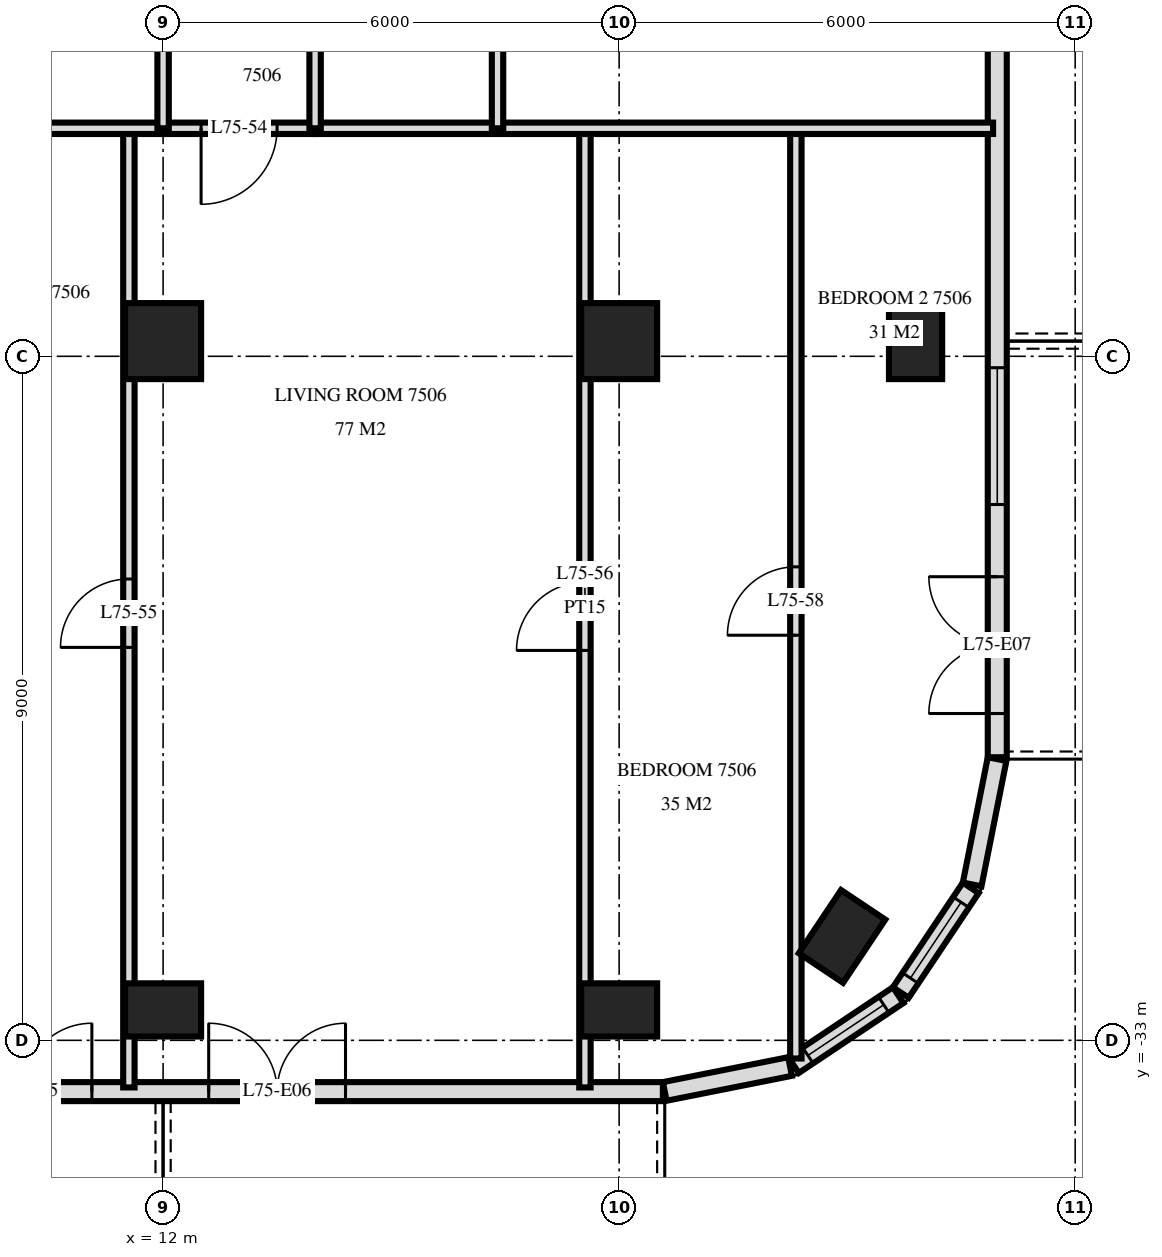
"""IFC4 building model, lengths in metres.
Left out: names, types, materials, properties, quantities, classifications, styles, units other than length and angle.
Written with IfcOpenShell. Run it as: python <this file> out.ifc"""

import sys

from ifc_helpers import new_model, si_unit, direction, frame, frame_2d, origin, origin_2d, place, context, subcontext, project, spatial, rectangle, extrude, element, fill, save


model = new_model("IFC4")
c1 = context("Model", 3, precision=1e-05, world=origin(), true_north=direction((0.0, 1.0)))
c2 = subcontext(c1, "Body", "Model", "MODEL_VIEW")
j1 = project(units=[si_unit("LENGTHUNIT", "METRE"), si_unit("PLANEANGLEUNIT", "RADIAN")], contexts=[c1])
p1 = place(None, origin())
s1 = spatial("IfcSite", under=j1, at=p1, CompositionType="ELEMENT")
p2 = place(p1, origin())
s2 = spatial("IfcBuilding", under=s1, at=p2, CompositionType="ELEMENT")
p3 = place(p2, frame((0.0, 0.0, 284.1)))
s3 = spatial("IfcBuildingStorey", under=s2, at=p3, CompositionType="ELEMENT", Elevation=284.1)
p4 = place(p3, frame((12.0, -32.6, 0.0), z_axis=(0.0, 0.0, 1.0), x_axis=(1.0, 0.0, 0.0)))
e1 = element("IfcColumn", 1, at=p4, inside=s3, PredefinedType="COLUMN", context=c2, shape_type="SweptSolid", body=[
    extrude(rectangle(XDim=1.0, YDim=0.7, at=origin_2d()), origin(), (0.0, 0.0, 1.0), 3.5),
])
p5 = place(p3, frame((12.0, -23.8, 0.0), z_axis=(0.0, 0.0, 1.0), x_axis=(1.0, 0.0, 0.0)))
e2 = element("IfcColumn", 2, at=p5, inside=s3, PredefinedType="COLUMN", context=c2, shape_type="SweptSolid", body=[
    extrude(rectangle(XDim=1.0, YDim=1.0, at=origin_2d()), origin(), (0.0, 0.0, 1.0), 3.5),
])
p6 = place(p3, frame((18.0, -32.6, 0.0), z_axis=(0.0, 0.0, 1.0), x_axis=(1.0, 0.0, 0.0)))
e3 = element("IfcColumn", 3, at=p6, inside=s3, PredefinedType="COLUMN", context=c2, shape_type="SweptSolid", body=[
    extrude(rectangle(XDim=1.0, YDim=0.7, at=origin_2d()), origin(), (0.0, 0.0, 1.0), 3.5),
])
p7 = place(p3, frame((18.0, -23.8, 0.0), z_axis=(0.0, 0.0, 1.0), x_axis=(1.0, 0.0, 0.0)))
e4 = element("IfcColumn", 4, at=p7, inside=s3, PredefinedType="COLUMN", context=c2, shape_type="SweptSolid", body=[
    extrude(rectangle(XDim=1.0, YDim=1.0, at=origin_2d()), origin(), (0.0, 0.0, 1.0), 3.5),
])
for number, where, z_axis, x_axis in (
    (5, (20.933, -31.633, 0.0), (0.0, 0.0, 1.0), (0.556, 0.831, 0.0)),
    (6, (21.9, -23.8, 0.0), (0.0, 0.0, 1.0), (0.0, 1.0, 0.0)),
):
    element("IfcColumn", number, at=place(p3, frame(where, z_axis=z_axis, x_axis=x_axis)), inside=s3, PredefinedType="COLUMN", context=c2, shape_type="SweptSolid", body=[
        extrude(rectangle(XDim=1.0, YDim=0.7, at=origin_2d()), origin(), (0.0, 0.0, 1.0), 3.5),
    ])
p8 = place(p3, frame((-18.575, -33.675, 0.0), z_axis=(0.0, 0.0, 1.0), x_axis=(1.0, 0.0, 0.0)))
e7 = element("IfcWall", 7, at=p8, inside=s3, PredefinedType="SOLIDWALL", context=c2, shape_type="SweptSolid", body=[
    extrude(rectangle(XDim=37.151, YDim=0.25, at=frame_2d((18.575, 0.0))), origin(), (0.0, 0.0, 1.0), 3.22),
])
p9 = place(p8, frame((1.175, 0.0, 0.0)))
e8 = element("IfcOpeningElement", 8, at=p9, cuts=e7, PredefinedType="OPENING", context=c2, shape_type="SweptSolid", body=[
    extrude(rectangle(XDim=1.8, YDim=2.4, at=frame_2d((0.9, 1.2))), frame((0.0, 0.135, 0.0), z_axis=(0.0, -1.0, 0.0), x_axis=(1.0, 0.0, 0.0)), (0.0, 0.0, 1.0), 0.27),
])
p10 = place(p8, frame((4.4, 0.0, 0.9)))
e9 = element("IfcOpeningElement", 9, at=p10, cuts=e7, PredefinedType="OPENING", context=c2, shape_type="SweptSolid", body=[
    extrude(rectangle(XDim=1.8, YDim=1.5, at=frame_2d((0.9, 0.75))), frame((0.0, 0.135, 0.0), z_axis=(0.0, -1.0, 0.0), x_axis=(1.0, 0.0, 0.0)), (0.0, 0.0, 1.0), 0.27),
])
p11 = place(p8, frame((6.875, 0.0, 0.9)))
e10 = element("IfcOpeningElement", 10, at=p11, cuts=e7, PredefinedType="OPENING", context=c2, shape_type="SweptSolid", body=[
    extrude(rectangle(XDim=2.4, YDim=1.5, at=frame_2d((1.2, 0.75))), frame((0.0, 0.135, 0.0), z_axis=(0.0, -1.0, 0.0), x_axis=(1.0, 0.0, 0.0)), (0.0, 0.0, 1.0), 0.27),
])
p12 = place(p8, frame((10.175, 0.0, 0.0)))
e11 = element("IfcOpeningElement", 11, at=p12, cuts=e7, PredefinedType="OPENING", context=c2, shape_type="SweptSolid", body=[
    extrude(rectangle(XDim=1.8, YDim=2.4, at=frame_2d((0.9, 1.2))), frame((0.0, 0.135, 0.0), z_axis=(0.0, -1.0, 0.0), x_axis=(1.0, 0.0, 0.0)), (0.0, 0.0, 1.0), 0.27),
])
p13 = place(p8, frame((13.175, 0.0, 0.0)))
e12 = element("IfcOpeningElement", 12, at=p13, cuts=e7, PredefinedType="OPENING", context=c2, shape_type="SweptSolid", body=[
    extrude(rectangle(XDim=1.8, YDim=2.4, at=frame_2d((0.9, 1.2))), frame((0.0, 0.135, 0.0), z_axis=(0.0, -1.0, 0.0), x_axis=(1.0, 0.0, 0.0)), (0.0, 0.0, 1.0), 0.27),
])
p14 = place(p8, frame((15.875, 0.0, 0.9)))
e13 = element("IfcOpeningElement", 13, at=p14, cuts=e7, PredefinedType="OPENING", context=c2, shape_type="SweptSolid", body=[
    extrude(rectangle(XDim=2.4, YDim=1.5, at=frame_2d((1.2, 0.75))), frame((0.0, 0.135, 0.0), z_axis=(0.0, -1.0, 0.0), x_axis=(1.0, 0.0, 0.0)), (0.0, 0.0, 1.0), 0.27),
])
p15 = place(p8, frame((19.175, 0.0, 0.0)))
e14 = element("IfcOpeningElement", 14, at=p15, cuts=e7, PredefinedType="OPENING", context=c2, shape_type="SweptSolid", body=[
    extrude(rectangle(XDim=1.8, YDim=2.4, at=frame_2d((0.9, 1.2))), frame((0.0, 0.135, 0.0), z_axis=(0.0, -1.0, 0.0), x_axis=(1.0, 0.0, 0.0)), (0.0, 0.0, 1.0), 0.27),
])
p16 = place(p8, frame((21.875, 0.0, 0.9)))
e15 = element("IfcOpeningElement", 15, at=p16, cuts=e7, PredefinedType="OPENING", context=c2, shape_type="SweptSolid", body=[
    extrude(rectangle(XDim=2.4, YDim=1.5, at=frame_2d((1.2, 0.75))), frame((0.0, 0.135, 0.0), z_axis=(0.0, -1.0, 0.0), x_axis=(1.0, 0.0, 0.0)), (0.0, 0.0, 1.0), 0.27),
])
p17 = place(p8, frame((25.063, 0.0, 0.9)))
e16 = element("IfcOpeningElement", 16, at=p17, cuts=e7, PredefinedType="OPENING", context=c2, shape_type="SweptSolid", body=[
    extrude(rectangle(XDim=1.8, YDim=1.5, at=frame_2d((0.9, 0.75))), frame((0.0, 0.135, 0.0), z_axis=(0.0, -1.0, 0.0), x_axis=(1.0, 0.0, 0.0)), (0.0, 0.0, 1.0), 0.27),
])
p18 = place(p8, frame((27.838, 0.0, 0.0)))
e17 = element("IfcOpeningElement", 17, at=p18, cuts=e7, PredefinedType="OPENING", context=c2, shape_type="SweptSolid", body=[
    extrude(rectangle(XDim=1.8, YDim=2.4, at=frame_2d((0.9, 1.2))), frame((0.0, 0.135, 0.0), z_axis=(0.0, -1.0, 0.0), x_axis=(1.0, 0.0, 0.0)), (0.0, 0.0, 1.0), 0.27),
])
p19 = place(p8, frame((31.175, 0.0, 0.0)))
e18 = element("IfcOpeningElement", 18, at=p19, cuts=e7, PredefinedType="OPENING", context=c2, shape_type="SweptSolid", body=[
    extrude(rectangle(XDim=1.8, YDim=2.4, at=frame_2d((0.9, 1.2))), frame((0.0, 0.135, 0.0), z_axis=(0.0, -1.0, 0.0), x_axis=(1.0, 0.0, 0.0)), (0.0, 0.0, 1.0), 0.27),
])
p20 = place(p3, frame((18.6, -33.673, 0.0), z_axis=(0.0, 0.0, 1.0), x_axis=(0.980770110232, 0.195166572128, 0.0)))
e19 = element("IfcWall", 19, at=p20, inside=s3, PredefinedType="SOLIDWALL", context=c2, shape_type="SweptSolid", body=[
    extrude(rectangle(XDim=1.681, YDim=0.25, at=frame_2d((0.841, 0.0))), origin(), (0.0, 0.0, 1.0), 3.22),
])
p21 = place(p3, frame((20.294, -33.326, 0.0), z_axis=(0.0, 0.0, 1.0), x_axis=(0.831482937015, 0.55555029066, 0.0)))
e20 = element("IfcWall", 20, at=p21, inside=s3, PredefinedType="SOLIDWALL", context=c2, shape_type="SweptSolid", body=[
    extrude(rectangle(XDim=1.656, YDim=0.25, at=frame_2d((0.828, 0.0))), origin(), (0.0, 0.0, 1.0), 3.22),
])
p22 = place(p21, frame((0.228, 0.0, 0.9)))
e21 = element("IfcOpeningElement", 21, at=p22, cuts=e20, PredefinedType="OPENING", context=c2, shape_type="SweptSolid", body=[
    extrude(rectangle(XDim=1.2, YDim=1.5, at=frame_2d((0.6, 0.75))), frame((0.0, 0.135, 0.0), z_axis=(0.0, -1.0, 0.0), x_axis=(1.0, 0.0, 0.0)), (0.0, 0.0, 1.0), 0.27),
])
p23 = place(p3, frame((21.706, -32.371, 0.0), z_axis=(0.0, 0.0, 1.0), x_axis=(0.55555029066, 0.831482937015, 0.0)))
e22 = element("IfcWall", 22, at=p23, inside=s3, PredefinedType="SOLIDWALL", context=c2, shape_type="SweptSolid", body=[
    extrude(rectangle(XDim=1.656, YDim=0.25, at=frame_2d((0.828, 0.0))), origin(), (0.0, 0.0, 1.0), 3.22),
])
p24 = place(p23, frame((0.228, 0.0, 0.9)))
e23 = element("IfcOpeningElement", 23, at=p24, cuts=e22, PredefinedType="OPENING", context=c2, shape_type="SweptSolid", body=[
    extrude(rectangle(XDim=1.2, YDim=1.5, at=frame_2d((0.6, 0.75))), frame((0.0, 0.135, 0.0), z_axis=(0.0, -1.0, 0.0), x_axis=(1.0, 0.0, 0.0)), (0.0, 0.0, 1.0), 0.27),
])
p25 = place(p3, frame((22.645, -30.949, 0.0), z_axis=(0.0, 0.0, 1.0), x_axis=(0.19513878023, 0.980775640221, 0.0)))
e24 = element("IfcWall", 24, at=p25, inside=s3, PredefinedType="SOLIDWALL", context=c2, shape_type="SweptSolid", body=[
    extrude(rectangle(XDim=1.681, YDim=0.25, at=frame_2d((0.841, 0.0))), origin(), (0.0, 0.0, 1.0), 3.22),
])
p26 = place(p3, frame((22.975, -29.275, 0.0), z_axis=(0.0, 0.0, 1.0), x_axis=(0.0, 1.0, 0.0)))
e25 = element("IfcWall", 25, at=p26, inside=s3, PredefinedType="SOLIDWALL", context=c2, shape_type="SweptSolid", body=[
    extrude(rectangle(XDim=25.951, YDim=0.25, at=frame_2d((12.975, 0.0))), origin(), (0.0, 0.0, 1.0), 3.22),
])
p27 = place(p26, frame((0.575, 0.0, 0.0)))
e26 = element("IfcOpeningElement", 26, at=p27, cuts=e25, PredefinedType="OPENING", context=c2, shape_type="SweptSolid", body=[
    extrude(rectangle(XDim=1.8, YDim=2.4, at=frame_2d((0.9, 1.2))), frame((0.0, 0.135, 0.0), z_axis=(0.0, -1.0, 0.0), x_axis=(1.0, 0.0, 0.0)), (0.0, 0.0, 1.0), 0.27),
])
p28 = place(p26, frame((3.325, 0.0, 0.9)))
e27 = element("IfcOpeningElement", 27, at=p28, cuts=e25, PredefinedType="OPENING", context=c2, shape_type="SweptSolid", body=[
    extrude(rectangle(XDim=1.8, YDim=1.5, at=frame_2d((0.9, 0.75))), frame((0.0, 0.135, 0.0), z_axis=(0.0, -1.0, 0.0), x_axis=(1.0, 0.0, 0.0)), (0.0, 0.0, 1.0), 0.27),
])
p29 = place(p26, frame((9.475, 0.0, 0.0)))
e28 = element("IfcOpeningElement", 28, at=p29, cuts=e25, PredefinedType="OPENING", context=c2, shape_type="SweptSolid", body=[
    extrude(rectangle(XDim=1.8, YDim=2.4, at=frame_2d((0.9, 1.2))), frame((0.0, 0.135, 0.0), z_axis=(0.0, -1.0, 0.0), x_axis=(1.0, 0.0, 0.0)), (0.0, 0.0, 1.0), 0.27),
])
p30 = place(p26, frame((16.175, 0.0, 0.0)))
e29 = element("IfcOpeningElement", 29, at=p30, cuts=e25, PredefinedType="OPENING", context=c2, shape_type="SweptSolid", body=[
    extrude(rectangle(XDim=1.8, YDim=2.4, at=frame_2d((0.9, 1.2))), frame((0.0, 0.135, 0.0), z_axis=(0.0, -1.0, 0.0), x_axis=(1.0, 0.0, 0.0)), (0.0, 0.0, 1.0), 0.27),
])
p31 = place(p26, frame((22.675, 0.0, 0.0)))
e30 = element("IfcOpeningElement", 30, at=p31, cuts=e25, PredefinedType="OPENING", context=c2, shape_type="SweptSolid", body=[
    extrude(rectangle(XDim=1.8, YDim=2.4, at=frame_2d((0.9, 1.2))), frame((0.0, 0.135, 0.0), z_axis=(0.0, -1.0, 0.0), x_axis=(1.0, 0.0, 0.0)), (0.0, 0.0, 1.0), 0.27),
])
p32 = place(p3, frame((20.325, -33.239, 0.0), z_axis=(0.0, 0.0, 1.0), x_axis=(0.0, 1.0, 0.0)))
e31 = element("IfcWall", 31, at=p32, inside=s3, PredefinedType="PARTITIONING", context=c2, shape_type="SweptSolid", body=[
    extrude(rectangle(XDim=12.239, YDim=0.15, at=frame_2d((6.12, 0.0))), origin(), (0.0, 0.0, 1.0), 3.22),
])
p33 = place(p32, frame((5.569, 0.0, 0.0)))
e32 = element("IfcOpeningElement", 32, at=p33, cuts=e31, PredefinedType="OPENING", context=c2, shape_type="SweptSolid", body=[
    extrude(rectangle(XDim=0.9, YDim=2.1, at=frame_2d((0.45, 1.05))), frame((0.0, 0.085, 0.0), z_axis=(0.0, -1.0, 0.0), x_axis=(1.0, 0.0, 0.0)), (0.0, 0.0, 1.0), 0.17),
])
p34 = place(p3, frame((17.55, -33.62, 0.0), z_axis=(0.0, 0.0, 1.0), x_axis=(0.0, 1.0, 0.0)))
e33 = element("IfcWall", 33, at=p34, inside=s3, PredefinedType="PARTITIONING", context=c2, shape_type="SweptSolid", body=[
    extrude(rectangle(XDim=12.62, YDim=0.15, at=frame_2d((6.31, 0.0))), origin(), (0.0, 0.0, 1.0), 3.22),
])
p35 = place(p34, frame((5.75, 0.0, 0.0)))
e34 = element("IfcOpeningElement", 34, at=p35, cuts=e33, PredefinedType="OPENING", context=c2, shape_type="SweptSolid", body=[
    extrude(rectangle(XDim=0.9, YDim=2.1, at=frame_2d((0.45, 1.05))), frame((0.0, 0.085, 0.0), z_axis=(0.0, -1.0, 0.0), x_axis=(1.0, 0.0, 0.0)), (0.0, 0.0, 1.0), 0.17),
])
p36 = place(p3, frame((16.4, -21.0, 0.0), z_axis=(0.0, 0.0, 1.0), x_axis=(0.0, 1.0, 0.0)))
e35 = element("IfcWall", 35, at=p36, inside=s3, PredefinedType="PARTITIONING", context=c2, shape_type="SweptSolid", body=[
    extrude(rectangle(XDim=4.2, YDim=0.15, at=frame_2d((2.1, 0.0))), origin(), (0.0, 0.0, 1.0), 3.22),
])
p37 = place(p3, frame((14.0, -21.0, 0.0), z_axis=(0.0, 0.0, 1.0), x_axis=(0.0, 1.0, 0.0)))
e36 = element("IfcWall", 36, at=p37, inside=s3, PredefinedType="PARTITIONING", context=c2, shape_type="SweptSolid", body=[
    extrude(rectangle(XDim=4.2, YDim=0.15, at=frame_2d((2.1, 0.0))), origin(), (0.0, 0.0, 1.0), 3.22),
])
p38 = place(p37, frame((1.6, 0.0, 0.0)))
e37 = element("IfcOpeningElement", 37, at=p38, cuts=e36, PredefinedType="OPENING", context=c2, shape_type="SweptSolid", body=[
    extrude(rectangle(XDim=1.0, YDim=2.1, at=frame_2d((0.5, 1.05))), frame((0.0, 0.085, 0.0), z_axis=(0.0, -1.0, 0.0), x_axis=(1.0, 0.0, 0.0)), (0.0, 0.0, 1.0), 0.17),
])
p39 = place(p3, frame((12.0, -21.0, 0.0), z_axis=(0.0, 0.0, 1.0), x_axis=(0.0, 1.0, 0.0)))
e38 = element("IfcWall", 38, at=p39, inside=s3, PredefinedType="PARTITIONING", context=c2, shape_type="SweptSolid", body=[
    extrude(rectangle(XDim=4.2, YDim=0.15, at=frame_2d((2.1, 0.0))), origin(), (0.0, 0.0, 1.0), 3.22),
])
p40 = place(p39, frame((1.6, 0.0, 0.0)))
e39 = element("IfcOpeningElement", 39, at=p40, cuts=e38, PredefinedType="OPENING", context=c2, shape_type="SweptSolid", body=[
    extrude(rectangle(XDim=1.0, YDim=2.1, at=frame_2d((0.5, 1.05))), frame((0.0, 0.085, 0.0), z_axis=(0.0, -1.0, 0.0), x_axis=(1.0, 0.0, 0.0)), (0.0, 0.0, 1.0), 0.17),
])
p41 = place(p3, frame((11.55, -33.62, 0.0), z_axis=(0.0, 0.0, 1.0), x_axis=(0.0, 1.0, 0.0)))
e40 = element("IfcWall", 40, at=p41, inside=s3, PredefinedType="PARTITIONING", context=c2, shape_type="SweptSolid", body=[
    extrude(rectangle(XDim=12.62, YDim=0.15, at=frame_2d((6.31, 0.0))), origin(), (0.0, 0.0, 1.0), 3.22),
])
p42 = place(p41, frame((5.79, 0.0, 0.0)))
e41 = element("IfcOpeningElement", 41, at=p42, cuts=e40, PredefinedType="OPENING", context=c2, shape_type="SweptSolid", body=[
    extrude(rectangle(XDim=0.9, YDim=2.1, at=frame_2d((0.45, 1.05))), frame((0.0, 0.085, 0.0), z_axis=(0.0, -1.0, 0.0), x_axis=(1.0, 0.0, 0.0)), (0.0, 0.0, 1.0), 0.17),
])
p43 = place(p3, frame((12.0, -21.0, 0.0), z_axis=(0.0, 0.0, 1.0), x_axis=(1.0, 0.0, 0.0)))
e42 = element("IfcWall", 42, at=p43, inside=s3, PredefinedType="PARTITIONING", context=c2, shape_type="SweptSolid", body=[
    extrude(rectangle(XDim=2.0, YDim=0.15, at=frame_2d((1.0, 0.0))), origin(), (0.0, 0.0, 1.0), 3.22),
])
p44 = place(p43, frame((0.5, 0.0, 0.0)))
e43 = element("IfcOpeningElement", 43, at=p44, cuts=e42, PredefinedType="OPENING", context=c2, shape_type="SweptSolid", body=[
    extrude(rectangle(XDim=1.0, YDim=2.1, at=frame_2d((0.5, 1.05))), frame((0.0, 0.085, 0.0), z_axis=(0.0, -1.0, 0.0), x_axis=(1.0, 0.0, 0.0)), (0.0, 0.0, 1.0), 0.17),
])
p45 = place(p3, frame((6.0, -21.0, 0.0), z_axis=(0.0, 0.0, 1.0), x_axis=(1.0, 0.0, 0.0)))
e44 = element("IfcWall", 44, at=p45, inside=s3, PredefinedType="PARTITIONING", context=c2, shape_type="SweptSolid", body=[
    extrude(rectangle(XDim=6.0, YDim=0.15, at=frame_2d((3.0, 0.0))), origin(), (0.0, 0.0, 1.0), 3.22),
])
p46 = place(p45, frame((0.8, 0.0, 0.0)))
e45 = element("IfcOpeningElement", 45, at=p46, cuts=e44, PredefinedType="OPENING", context=c2, shape_type="SweptSolid", body=[
    extrude(rectangle(XDim=0.8, YDim=2.1, at=frame_2d((0.4, 1.05))), frame((0.0, 0.085, 0.0), z_axis=(0.0, -1.0, 0.0), x_axis=(1.0, 0.0, 0.0)), (0.0, 0.0, 1.0), 0.17),
])
p47 = place(p3, frame((14.0, -21.0, 0.0), z_axis=(0.0, 0.0, 1.0), x_axis=(1.0, 0.0, 0.0)))
e46 = element("IfcWall", 46, at=p47, inside=s3, PredefinedType="PARTITIONING", context=c2, shape_type="SweptSolid", body=[
    extrude(rectangle(XDim=8.92, YDim=0.15, at=frame_2d((4.46, 0.0))), origin(), (0.0, 0.0, 1.0), 3.22),
])
p48 = place(p22, origin())
e47 = element("IfcWindow", 47, at=p48, inside=s3, PartitioningType="SINGLE_PANEL", PredefinedType="WINDOW", context=c2, shape_type="SweptSolid", body=[
    extrude(rectangle(XDim=1.2, YDim=1.5, at=frame_2d((0.6, 0.75))), frame((0.0, 0.03, 0.0), z_axis=(0.0, -1.0, 0.0), x_axis=(1.0, 0.0, 0.0)), (0.0, 0.0, 1.0), 0.06),
])
fill(e21, e47)
p49 = place(p24, origin())
e48 = element("IfcWindow", 48, at=p49, inside=s3, PartitioningType="SINGLE_PANEL", PredefinedType="WINDOW", context=c2, shape_type="SweptSolid", body=[
    extrude(rectangle(XDim=1.2, YDim=1.5, at=frame_2d((0.6, 0.75))), frame((0.0, 0.03, 0.0), z_axis=(0.0, -1.0, 0.0), x_axis=(1.0, 0.0, 0.0)), (0.0, 0.0, 1.0), 0.06),
])
fill(e23, e48)
p50 = place(p18, origin())
e49 = element("IfcDoor", 49, at=p50, inside=s3, OperationType="DOUBLE_DOOR_SINGLE_SWING", PredefinedType="DOOR", context=c2, shape_type="SweptSolid", body=[
    extrude(rectangle(XDim=1.8, YDim=2.4, at=frame_2d((0.9, 1.2))), frame((0.0, 0.025, 0.0), z_axis=(0.0, -1.0, 0.0), x_axis=(1.0, 0.0, 0.0)), (0.0, 0.0, 1.0), 0.05),
])
fill(e17, e49)
p51 = place(p19, origin())
e50 = element("IfcDoor", 50, at=p51, inside=s3, OperationType="DOUBLE_DOOR_SINGLE_SWING", PredefinedType="DOOR", context=c2, shape_type="SweptSolid", body=[
    extrude(rectangle(XDim=1.8, YDim=2.4, at=frame_2d((0.9, 1.2))), frame((0.0, 0.025, 0.0), z_axis=(0.0, -1.0, 0.0), x_axis=(1.0, 0.0, 0.0)), (0.0, 0.0, 1.0), 0.05),
])
fill(e18, e50)
p52 = place(p27, origin())
e51 = element("IfcDoor", 51, at=p52, inside=s3, OperationType="DOUBLE_DOOR_SINGLE_SWING", PredefinedType="DOOR", context=c2, shape_type="SweptSolid", body=[
    extrude(rectangle(XDim=1.8, YDim=2.4, at=frame_2d((0.9, 1.2))), frame((0.0, 0.025, 0.0), z_axis=(0.0, -1.0, 0.0), x_axis=(1.0, 0.0, 0.0)), (0.0, 0.0, 1.0), 0.05),
])
fill(e26, e51)
p53 = place(p28, origin())
e52 = element("IfcWindow", 52, at=p53, inside=s3, PartitioningType="SINGLE_PANEL", PredefinedType="WINDOW", context=c2, shape_type="SweptSolid", body=[
    extrude(rectangle(XDim=1.8, YDim=1.5, at=frame_2d((0.9, 0.75))), frame((0.0, 0.03, 0.0), z_axis=(0.0, -1.0, 0.0), x_axis=(1.0, 0.0, 0.0)), (0.0, 0.0, 1.0), 0.06),
])
fill(e27, e52)
p54 = place(p44, frame((0.5, 0.0, 0.0), z_axis=(0.0, 0.0, 1.0), x_axis=(-1.0, 0.0, 0.0)))
e53 = element("IfcDoor", 53, at=p54, inside=s3, OperationType="SINGLE_SWING_LEFT", PredefinedType="DOOR", context=c2, shape_type="SweptSolid", body=[
    extrude(rectangle(XDim=1.0, YDim=2.1, at=frame_2d((0.0, 1.05))), frame((0.0, -0.025, 0.0), z_axis=(0.0, 1.0, 0.0), x_axis=(-1.0, 0.0, 0.0)), (0.0, 0.0, 1.0), 0.05),
])
fill(e43, e53)
p55 = place(p42, origin())
e54 = element("IfcDoor", 54, at=p55, inside=s3, OperationType="SINGLE_SWING_RIGHT", PredefinedType="DOOR", context=c2, shape_type="SweptSolid", body=[
    extrude(rectangle(XDim=0.9, YDim=2.1, at=frame_2d((0.45, 1.05))), frame((0.0, 0.025, 0.0), z_axis=(0.0, -1.0, 0.0), x_axis=(1.0, 0.0, 0.0)), (0.0, 0.0, 1.0), 0.05),
])
fill(e41, e54)
p56 = place(p35, origin())
e55 = element("IfcDoor", 55, at=p56, inside=s3, OperationType="SINGLE_SWING_RIGHT", PredefinedType="DOOR", context=c2, shape_type="SweptSolid", body=[
    extrude(rectangle(XDim=0.9, YDim=2.1, at=frame_2d((0.45, 1.05))), frame((0.0, 0.025, 0.0), z_axis=(0.0, -1.0, 0.0), x_axis=(1.0, 0.0, 0.0)), (0.0, 0.0, 1.0), 0.05),
])
fill(e34, e55)
p57 = place(p33, origin())
e56 = element("IfcDoor", 56, at=p57, inside=s3, OperationType="SINGLE_SWING_RIGHT", PredefinedType="DOOR", context=c2, shape_type="SweptSolid", body=[
    extrude(rectangle(XDim=0.9, YDim=2.1, at=frame_2d((0.45, 1.05))), frame((0.0, 0.025, 0.0), z_axis=(0.0, -1.0, 0.0), x_axis=(1.0, 0.0, 0.0)), (0.0, 0.0, 1.0), 0.05),
])
fill(e32, e56)
save(model, sys.argv[1])
